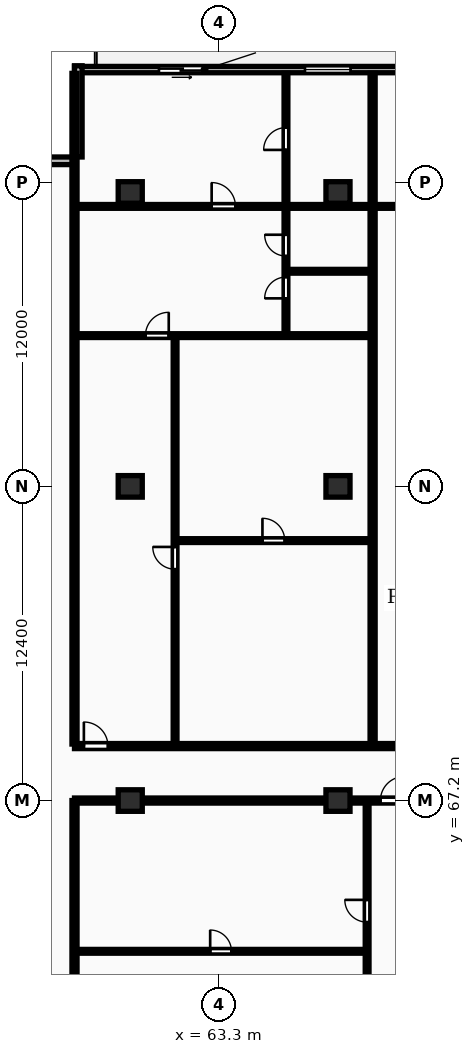
"""IFC4 building model, lengths in metres.
Left out: names, types, materials, properties, quantities, classifications, styles, units other than length and angle.
Written with IfcOpenShell. Run it as: python <this file> out.ifc"""

import sys

from ifc_helpers import new_model, si_unit, direction, frame, frame_2d, origin, origin_2d, place, context, subcontext, project, spatial, rectangle, extrude, element, fill, save


model = new_model("IFC4")
c1 = context("Model", 3, precision=1e-05, world=origin(), true_north=direction((0.0, 1.0)))
c2 = subcontext(c1, "Body", "Model", "MODEL_VIEW")
j1 = project(units=[si_unit("LENGTHUNIT", "METRE"), si_unit("PLANEANGLEUNIT", "RADIAN")], contexts=[c1])
p1 = place(None, origin())
s1 = spatial("IfcSite", under=j1, at=p1, CompositionType="ELEMENT")
p2 = place(p1, origin())
s2 = spatial("IfcBuilding", under=s1, at=p2, CompositionType="ELEMENT")
p3 = place(p2, frame((0.0, 0.0, 80.8)))
s3 = spatial("IfcBuildingStorey", under=s2, at=p3, CompositionType="ELEMENT", Elevation=80.8)
for number, where, z_axis, x_axis in (
    (1, (59.8, 67.2, 0.0), (0.0, 0.0, 1.0), (1.0, 0.0, 0.0)),
    (2, (59.8, 79.6, 0.0), (0.0, 0.0, 1.0), (1.0, 0.0, 0.0)),
    (3, (59.8, 91.2, 0.0), (0.0, 0.0, 1.0), (1.0, 0.0, 0.0)),
    (4, (68.0, 67.2, 0.0), (0.0, 0.0, 1.0), (1.0, 0.0, 0.0)),
    (5, (68.0, 79.6, 0.0), (0.0, 0.0, 1.0), (1.0, 0.0, 0.0)),
    (6, (68.0, 91.2, 0.0), (0.0, 0.0, 1.0), (1.0, 0.0, 0.0)),
):
    element("IfcColumn", number, at=place(p3, frame(where, z_axis=z_axis, x_axis=x_axis)), inside=s3, PredefinedType="COLUMN", context=c2, shape_type="SweptSolid", body=[
        extrude(rectangle(XDim=0.95, YDim=0.85, at=origin_2d()), origin(), (0.0, 0.0, 1.0), 3.25),
    ])
p4 = place(p3, frame((130.6, 96.05, 0.0), z_axis=(0.0, 0.0, 1.0), x_axis=(-1.0, 0.0, 0.0)))
e7 = element("IfcWall", 7, at=p4, inside=s3, PredefinedType="STANDARD", context=c2, shape_type="SweptSolid", body=[
    extrude(rectangle(XDim=73.0, YDim=0.25, at=frame_2d((36.5, 0.0))), origin(), (0.0, 0.0, 1.0), 2.97),
])
p5 = place(p4, frame((67.867, 0.0, 0.0)))
e8 = element("IfcOpeningElement", 8, at=p5, cuts=e7, PredefinedType="OPENING", context=c2, shape_type="SweptSolid", body=[
    extrude(rectangle(XDim=1.8, YDim=2.2, at=frame_2d((0.9, 1.1))), frame((0.0, 0.135, 0.0), z_axis=(0.0, -1.0, 0.0), x_axis=(1.0, 0.0, 0.0)), (0.0, 0.0, 1.0), 0.27),
])
p6 = place(p4, frame((62.103, 0.0, 0.85)))
e9 = element("IfcOpeningElement", 9, at=p6, cuts=e7, PredefinedType="OPENING", context=c2, shape_type="SweptSolid", body=[
    extrude(rectangle(XDim=1.8, YDim=1.8, at=frame_2d((0.9, 0.9))), frame((0.0, 0.135, 0.0), z_axis=(0.0, -1.0, 0.0), x_axis=(1.0, 0.0, 0.0)), (0.0, 0.0, 1.0), 0.27),
])
p7 = place(p4, frame((56.196, 0.0, 0.0)))
e10 = element("IfcOpeningElement", 10, at=p7, cuts=e7, PredefinedType="OPENING", context=c2, shape_type="SweptSolid", body=[
    extrude(rectangle(XDim=1.8, YDim=2.2, at=frame_2d((0.9, 1.1))), frame((0.0, 0.135, 0.0), z_axis=(0.0, -1.0, 0.0), x_axis=(1.0, 0.0, 0.0)), (0.0, 0.0, 1.0), 0.27),
])
p8 = place(p4, frame((46.557, 0.0, 0.85)))
e11 = element("IfcOpeningElement", 11, at=p8, cuts=e7, PredefinedType="OPENING", context=c2, shape_type="SweptSolid", body=[
    extrude(rectangle(XDim=2.4, YDim=1.9, at=frame_2d((1.2, 0.95))), frame((0.0, 0.135, 0.0), z_axis=(0.0, -1.0, 0.0), x_axis=(1.0, 0.0, 0.0)), (0.0, 0.0, 1.0), 0.27),
])
p9 = place(p4, frame((36.714, 0.0, 0.0)))
e12 = element("IfcOpeningElement", 12, at=p9, cuts=e7, PredefinedType="OPENING", context=c2, shape_type="SweptSolid", body=[
    extrude(rectangle(XDim=1.8, YDim=2.2, at=frame_2d((0.9, 1.1))), frame((0.0, 0.135, 0.0), z_axis=(0.0, -1.0, 0.0), x_axis=(1.0, 0.0, 0.0)), (0.0, 0.0, 1.0), 0.27),
])
p10 = place(p4, frame((30.483, 0.0, 0.85)))
e13 = element("IfcOpeningElement", 13, at=p10, cuts=e7, PredefinedType="OPENING", context=c2, shape_type="SweptSolid", body=[
    extrude(rectangle(XDim=1.8, YDim=1.8, at=frame_2d((0.9, 0.9))), frame((0.0, 0.135, 0.0), z_axis=(0.0, -1.0, 0.0), x_axis=(1.0, 0.0, 0.0)), (0.0, 0.0, 1.0), 0.27),
])
p11 = place(p4, frame((21.604, 0.0, 0.85)))
e14 = element("IfcOpeningElement", 14, at=p11, cuts=e7, PredefinedType="OPENING", context=c2, shape_type="SweptSolid", body=[
    extrude(rectangle(XDim=2.4, YDim=1.9, at=frame_2d((1.2, 0.95))), frame((0.0, 0.135, 0.0), z_axis=(0.0, -1.0, 0.0), x_axis=(1.0, 0.0, 0.0)), (0.0, 0.0, 1.0), 0.27),
])
p12 = place(p4, frame((17.698, 0.0, 0.85)))
e15 = element("IfcOpeningElement", 15, at=p12, cuts=e7, PredefinedType="OPENING", context=c2, shape_type="SweptSolid", body=[
    extrude(rectangle(XDim=1.8, YDim=1.8, at=frame_2d((0.9, 0.9))), frame((0.0, 0.135, 0.0), z_axis=(0.0, -1.0, 0.0), x_axis=(1.0, 0.0, 0.0)), (0.0, 0.0, 1.0), 0.27),
])
p13 = place(p4, frame((26.363, 0.0, 0.0)))
e16 = element("IfcOpeningElement", 16, at=p13, cuts=e7, PredefinedType="OPENING", context=c2, shape_type="SweptSolid", body=[
    extrude(rectangle(XDim=1.8, YDim=2.2, at=frame_2d((0.9, 1.1))), frame((0.0, 0.135, 0.0), z_axis=(0.0, -1.0, 0.0), x_axis=(1.0, 0.0, 0.0)), (0.0, 0.0, 1.0), 0.27),
])
p14 = place(p4, frame((13.753, 0.0, 0.85)))
e17 = element("IfcOpeningElement", 17, at=p14, cuts=e7, PredefinedType="OPENING", context=c2, shape_type="SweptSolid", body=[
    extrude(rectangle(XDim=1.8, YDim=1.8, at=frame_2d((0.9, 0.9))), frame((0.0, 0.135, 0.0), z_axis=(0.0, -1.0, 0.0), x_axis=(1.0, 0.0, 0.0)), (0.0, 0.0, 1.0), 0.27),
])
p15 = place(p4, frame((7.363, 0.0, 0.0)))
e18 = element("IfcOpeningElement", 18, at=p15, cuts=e7, PredefinedType="OPENING", context=c2, shape_type="SweptSolid", body=[
    extrude(rectangle(XDim=1.8, YDim=2.2, at=frame_2d((0.9, 1.1))), frame((0.0, 0.135, 0.0), z_axis=(0.0, -1.0, 0.0), x_axis=(1.0, 0.0, 0.0)), (0.0, 0.0, 1.0), 0.27),
])
p16 = place(p4, frame((0.9, 0.0, 0.85)))
e19 = element("IfcOpeningElement", 19, at=p16, cuts=e7, PredefinedType="OPENING", context=c2, shape_type="SweptSolid", body=[
    extrude(rectangle(XDim=2.4, YDim=1.9, at=frame_2d((1.2, 0.95))), frame((0.0, 0.135, 0.0), z_axis=(0.0, -1.0, 0.0), x_axis=(1.0, 0.0, 0.0)), (0.0, 0.0, 1.0), 0.27),
])
p17 = place(p3, frame((57.75, 96.2, 0.0), z_axis=(0.0, 0.0, 1.0), x_axis=(0.0, -1.0, 0.0)))
e20 = element("IfcWall", 20, at=p17, inside=s3, PredefinedType="STANDARD", context=c2, shape_type="SweptSolid", body=[
    extrude(rectangle(XDim=3.6, YDim=0.3, at=frame_2d((1.8, 0.0))), origin(), (0.0, 0.0, 1.0), 2.97),
])
p18 = place(p3, frame((57.6, 92.45, 0.0), z_axis=(0.0, 0.0, 1.0), x_axis=(-1.0, 0.0, 0.0)))
e21 = element("IfcWall", 21, at=p18, inside=s3, PredefinedType="STANDARD", context=c2, shape_type="SweptSolid", body=[
    extrude(rectangle(XDim=3.6, YDim=0.3, at=frame_2d((1.8, 0.0))), origin(), (0.0, 0.0, 1.0), 2.97),
])
p19 = place(p3, frame((57.6, 51.1, 0.0), z_axis=(0.0, 0.0, 1.0), x_axis=(0.0, 1.0, 0.0)))
e22 = element("IfcWall", 22, at=p19, inside=s3, PredefinedType="PARTITIONING", context=c2, shape_type="SweptSolid", body=[
    extrude(rectangle(XDim=16.1, YDim=0.2, at=frame_2d((8.05, 0.0))), origin(), (0.0, 0.0, 1.0), 2.97),
])
p20 = place(p3, frame((57.6, 61.25, 0.0), z_axis=(0.0, 0.0, 1.0), x_axis=(1.0, 0.0, 0.0)))
e23 = element("IfcWall", 23, at=p20, inside=s3, PredefinedType="PARTITIONING", context=c2, shape_type="SweptSolid", body=[
    extrude(rectangle(XDim=11.55, YDim=0.15, at=frame_2d((5.775, 0.0))), origin(), (0.0, 0.0, 1.0), 2.97),
])
p21 = place(p20, frame((5.355, 0.0, 0.0)))
e24 = element("IfcOpeningElement", 24, at=p21, cuts=e23, PredefinedType="OPENING", context=c2, shape_type="SweptSolid", body=[
    extrude(rectangle(XDim=0.84, YDim=2.04, at=frame_2d((0.42, 1.02))), frame((0.0, 0.085, 0.0), z_axis=(0.0, -1.0, 0.0), x_axis=(1.0, 0.0, 0.0)), (0.0, 0.0, 1.0), 0.17),
])
p22 = place(p3, frame((69.15, 51.1, 0.0), z_axis=(0.0, 0.0, 1.0), x_axis=(0.0, 1.0, 0.0)))
e25 = element("IfcWall", 25, at=p22, inside=s3, PredefinedType="PARTITIONING", context=c2, shape_type="SweptSolid", body=[
    extrude(rectangle(XDim=16.05, YDim=0.15, at=frame_2d((8.025, 0.0))), origin(), (0.0, 0.0, 1.0), 2.97),
])
p23 = place(p22, frame((11.3, 0.0, 0.0)))
e26 = element("IfcOpeningElement", 26, at=p23, cuts=e25, PredefinedType="OPENING", context=c2, shape_type="SweptSolid", body=[
    extrude(rectangle(XDim=0.88, YDim=2.06, at=frame_2d((0.44, 1.03))), frame((0.0, 0.085, 0.0), z_axis=(0.0, -1.0, 0.0), x_axis=(1.0, 0.0, 0.0)), (0.0, 0.0, 1.0), 0.17),
])
p24 = place(p3, frame((57.6, 67.2, 0.0), z_axis=(0.0, 0.0, 1.0), x_axis=(1.0, 0.0, 0.0)))
e27 = element("IfcWall", 27, at=p24, inside=s3, PredefinedType="PARTITIONING", context=c2, shape_type="SweptSolid", body=[
    extrude(rectangle(XDim=18.35, YDim=0.2, at=frame_2d((9.175, 0.0))), origin(), (0.0, 0.0, 1.0), 2.433),
])
p25 = place(p24, frame((12.075, 0.0, 0.0)))
e28 = element("IfcOpeningElement", 28, at=p25, cuts=e27, PredefinedType="OPENING", context=c2, shape_type="SweptSolid", body=[
    extrude(rectangle(XDim=0.95, YDim=2.15, at=frame_2d((0.475, 1.075))), frame((0.0, 0.11, 0.0), z_axis=(0.0, -1.0, 0.0), x_axis=(1.0, 0.0, 0.0)), (0.0, 0.0, 1.0), 0.22),
])
for number, where, z_axis, x_axis in (
    (29, (57.6, 69.43, 0.0), (0.0, 0.0, 1.0), (0.0, 1.0, 0.0)),
    (30, (69.367, 69.43, 0.0), (0.0, 0.0, 1.0), (0.0, 1.0, 0.0)),
):
    element("IfcWall", number, at=place(p3, frame(where, z_axis=z_axis, x_axis=x_axis)), inside=s3, PredefinedType="PARTITIONING", context=c2, shape_type="SweptSolid", body=[
        extrude(rectangle(XDim=26.47, YDim=0.2, at=frame_2d((13.235, 0.0))), origin(), (0.0, 0.0, 1.0), 2.97),
    ])
p26 = place(p3, frame((61.63, 77.46, 0.0), z_axis=(0.0, 0.0, 1.0), x_axis=(1.0, 0.0, 0.0)))
e31 = element("IfcWall", 31, at=p26, inside=s3, PredefinedType="PARTITIONING", context=c2, shape_type="SweptSolid", body=[
    extrude(rectangle(XDim=7.657, YDim=0.15, at=frame_2d((3.828, 0.0))), origin(), (0.0, 0.0, 1.0), 2.97),
])
p27 = place(p26, frame((3.388, 0.0, 0.0)))
e32 = element("IfcOpeningElement", 32, at=p27, cuts=e31, PredefinedType="OPENING", context=c2, shape_type="SweptSolid", body=[
    extrude(rectangle(XDim=0.88, YDim=2.06, at=frame_2d((0.44, 1.03))), frame((0.0, 0.085, 0.0), z_axis=(0.0, -1.0, 0.0), x_axis=(1.0, 0.0, 0.0)), (0.0, 0.0, 1.0), 0.17),
])
p28 = place(p3, frame((61.57, 69.41, 0.0), z_axis=(0.0, 0.0, 1.0), x_axis=(0.0, 1.0, 0.0)))
e33 = element("IfcWall", 33, at=p28, inside=s3, PredefinedType="PARTITIONING", context=c2, shape_type="SweptSolid", body=[
    extrude(rectangle(XDim=16.1, YDim=0.15, at=frame_2d((8.05, 0.0))), origin(), (0.0, 0.0, 1.0), 2.97),
])
p29 = place(p28, frame((6.92, 0.0, 0.0)))
e34 = element("IfcOpeningElement", 34, at=p29, cuts=e33, PredefinedType="OPENING", context=c2, shape_type="SweptSolid", body=[
    extrude(rectangle(XDim=0.88, YDim=2.06, at=frame_2d((0.44, 1.03))), frame((0.0, 0.085, 0.0), z_axis=(0.0, -1.0, 0.0), x_axis=(1.0, 0.0, 0.0)), (0.0, 0.0, 1.0), 0.17),
])
p30 = place(p3, frame((66.007, 88.09, 0.0), z_axis=(0.0, 0.0, 1.0), x_axis=(1.0, 0.0, 0.0)))
e35 = element("IfcWall", 35, at=p30, inside=s3, PredefinedType="PARTITIONING", context=c2, shape_type="SweptSolid", body=[
    extrude(rectangle(XDim=3.28, YDim=0.15, at=frame_2d((1.64, 0.0))), origin(), (0.0, 0.0, 1.0), 2.97),
])
p31 = place(p3, frame((65.947, 85.59, 0.0), z_axis=(0.0, 0.0, 1.0), x_axis=(0.0, 1.0, 0.0)))
e36 = element("IfcWall", 36, at=p31, inside=s3, PredefinedType="PARTITIONING", context=c2, shape_type="SweptSolid", body=[
    extrude(rectangle(XDim=10.31, YDim=0.15, at=frame_2d((5.155, 0.0))), origin(), (0.0, 0.0, 1.0), 2.97),
])
p32 = place(p31, frame((1.43, 0.0, 0.0)))
e37 = element("IfcOpeningElement", 37, at=p32, cuts=e36, PredefinedType="OPENING", context=c2, shape_type="SweptSolid", body=[
    extrude(rectangle(XDim=0.84, YDim=2.04, at=frame_2d((0.42, 1.02))), frame((0.0, 0.085, 0.0), z_axis=(0.0, -1.0, 0.0), x_axis=(1.0, 0.0, 0.0)), (0.0, 0.0, 1.0), 0.17),
])
p33 = place(p31, frame((3.102, 0.0, 0.0)))
e38 = element("IfcOpeningElement", 38, at=p33, cuts=e36, PredefinedType="OPENING", context=c2, shape_type="SweptSolid", body=[
    extrude(rectangle(XDim=0.84, YDim=2.04, at=frame_2d((0.42, 1.02))), frame((0.0, 0.085, 0.0), z_axis=(0.0, -1.0, 0.0), x_axis=(1.0, 0.0, 0.0)), (0.0, 0.0, 1.0), 0.17),
])
p34 = place(p31, frame((7.29, 0.0, 0.0)))
e39 = element("IfcOpeningElement", 39, at=p34, cuts=e36, PredefinedType="OPENING", context=c2, shape_type="SweptSolid", body=[
    extrude(rectangle(XDim=0.88, YDim=2.06, at=frame_2d((0.44, 1.03))), frame((0.0, 0.085, 0.0), z_axis=(0.0, -1.0, 0.0), x_axis=(1.0, 0.0, 0.0)), (0.0, 0.0, 1.0), 0.17),
])
p35 = place(p3, frame((57.68, 85.55, 0.0), z_axis=(0.0, 0.0, 1.0), x_axis=(1.0, 0.0, 0.0)))
e40 = element("IfcWall", 40, at=p35, inside=s3, PredefinedType="PARTITIONING", context=c2, shape_type="SweptSolid", body=[
    extrude(rectangle(XDim=11.607, YDim=0.15, at=frame_2d((5.803, 0.0))), origin(), (0.0, 0.0, 1.0), 2.97),
])
p36 = place(p35, frame((2.72, 0.0, 0.0)))
e41 = element("IfcOpeningElement", 41, at=p36, cuts=e40, PredefinedType="OPENING", context=c2, shape_type="SweptSolid", body=[
    extrude(rectangle(XDim=0.92, YDim=2.08, at=frame_2d((0.46, 1.04))), frame((0.0, 0.085, 0.0), z_axis=(0.0, -1.0, 0.0), x_axis=(1.0, 0.0, 0.0)), (0.0, 0.0, 1.0), 0.17),
])
p37 = place(p3, frame((57.68, 90.65, 0.0), z_axis=(0.0, 0.0, 1.0), x_axis=(1.0, 0.0, 0.0)))
e42 = element("IfcWall", 42, at=p37, inside=s3, PredefinedType="PARTITIONING", context=c2, shape_type="SweptSolid", body=[
    extrude(rectangle(XDim=11.607, YDim=0.15, at=frame_2d((5.803, 0.0))), origin(), (0.0, 0.0, 1.0), 2.97),
])
p38 = place(p37, frame((5.333, 0.0, 0.0)))
e43 = element("IfcOpeningElement", 43, at=p38, cuts=e42, PredefinedType="OPENING", context=c2, shape_type="SweptSolid", body=[
    extrude(rectangle(XDim=0.94, YDim=2.1, at=frame_2d((0.47, 1.05))), frame((0.0, 0.085, 0.0), z_axis=(0.0, -1.0, 0.0), x_axis=(1.0, 0.0, 0.0)), (0.0, 0.0, 1.0), 0.17),
])
p39 = place(p3, frame((69.447, 90.65, 0.0), z_axis=(0.0, 0.0, 1.0), x_axis=(1.0, 0.0, 0.0)))
e44 = element("IfcWall", 44, at=p39, inside=s3, PredefinedType="PARTITIONING", context=c2, shape_type="SweptSolid", body=[
    extrude(rectangle(XDim=18.758, YDim=0.15, at=frame_2d((9.379, 0.0))), origin(), (0.0, 0.0, 1.0), 2.97),
])
p40 = place(p39, frame((3.965, 0.0, 0.0)))
e45 = element("IfcOpeningElement", 45, at=p40, cuts=e44, PredefinedType="OPENING", context=c2, shape_type="SweptSolid", body=[
    extrude(rectangle(XDim=0.94, YDim=2.1, at=frame_2d((0.47, 1.05))), frame((0.0, 0.085, 0.0), z_axis=(0.0, -1.0, 0.0), x_axis=(1.0, 0.0, 0.0)), (0.0, 0.0, 1.0), 0.17),
])
p41 = place(p39, frame((8.909, 0.0, 0.0)))
e46 = element("IfcOpeningElement", 46, at=p41, cuts=e44, PredefinedType="OPENING", context=c2, shape_type="SweptSolid", body=[
    extrude(rectangle(XDim=0.94, YDim=2.1, at=frame_2d((0.47, 1.05))), frame((0.0, 0.085, 0.0), z_axis=(0.0, -1.0, 0.0), x_axis=(1.0, 0.0, 0.0)), (0.0, 0.0, 1.0), 0.17),
])
p42 = place(p3, frame((57.6, 69.35, 0.0), z_axis=(0.0, 0.0, 1.0), x_axis=(1.0, 0.0, 0.0)))
e47 = element("IfcWall", 47, at=p42, inside=s3, PredefinedType="PARTITIONING", context=c2, shape_type="SweptSolid", body=[
    extrude(rectangle(XDim=73.0, YDim=0.2, at=frame_2d((36.5, 0.0))), origin(), (0.0, 0.0, 1.0), 2.97),
])
p43 = place(p42, frame((0.37, 0.0, 0.0)))
e48 = element("IfcOpeningElement", 48, at=p43, cuts=e47, PredefinedType="OPENING", context=c2, shape_type="SweptSolid", body=[
    extrude(rectangle(XDim=0.95, YDim=2.15, at=frame_2d((0.475, 1.075))), frame((0.0, 0.11, 0.0), z_axis=(0.0, -1.0, 0.0), x_axis=(1.0, 0.0, 0.0)), (0.0, 0.0, 1.0), 0.22),
])
p44 = place(p42, frame((20.421, 0.0, 0.0)))
e49 = element("IfcOpeningElement", 49, at=p44, cuts=e47, PredefinedType="OPENING", context=c2, shape_type="SweptSolid", body=[
    extrude(rectangle(XDim=1.22, YDim=2.18, at=frame_2d((0.61, 1.09))), frame((0.0, 0.11, 0.0), z_axis=(0.0, -1.0, 0.0), x_axis=(1.0, 0.0, 0.0)), (0.0, 0.0, 1.0), 0.22),
])
p45 = place(p42, frame((32.729, 0.0, 0.0)))
e50 = element("IfcOpeningElement", 50, at=p45, cuts=e47, PredefinedType="OPENING", context=c2, shape_type="SweptSolid", body=[
    extrude(rectangle(XDim=0.95, YDim=2.15, at=frame_2d((0.475, 1.075))), frame((0.0, 0.11, 0.0), z_axis=(0.0, -1.0, 0.0), x_axis=(1.0, 0.0, 0.0)), (0.0, 0.0, 1.0), 0.22),
])
p46 = place(p42, frame((46.157, 0.0, 0.0)))
e51 = element("IfcOpeningElement", 51, at=p46, cuts=e47, PredefinedType="OPENING", context=c2, shape_type="SweptSolid", body=[
    extrude(rectangle(XDim=0.95, YDim=2.15, at=frame_2d((0.475, 1.075))), frame((0.0, 0.11, 0.0), z_axis=(0.0, -1.0, 0.0), x_axis=(1.0, 0.0, 0.0)), (0.0, 0.0, 1.0), 0.22),
])
p47 = place(p42, frame((60.803, 0.0, 0.0)))
e52 = element("IfcOpeningElement", 52, at=p47, cuts=e47, PredefinedType="OPENING", context=c2, shape_type="SweptSolid", body=[
    extrude(rectangle(XDim=0.95, YDim=2.15, at=frame_2d((0.475, 1.075))), frame((0.0, 0.11, 0.0), z_axis=(0.0, -1.0, 0.0), x_axis=(1.0, 0.0, 0.0)), (0.0, 0.0, 1.0), 0.22),
])
p48 = place(p5, origin())
e53 = element("IfcDoor", 53, at=p48, inside=s3, OperationType="SLIDING_TO_LEFT", PredefinedType="DOOR", context=c2, shape_type="SweptSolid", body=[
    extrude(rectangle(XDim=1.8, YDim=2.2, at=frame_2d((0.9, 1.1))), frame((0.0, 0.025, 0.0), z_axis=(0.0, -1.0, 0.0), x_axis=(1.0, 0.0, 0.0)), (0.0, 0.0, 1.0), 0.05),
])
fill(e8, e53)
p49 = place(p6, origin())
e54 = element("IfcWindow", 54, at=p49, inside=s3, PartitioningType="SINGLE_PANEL", PredefinedType="WINDOW", context=c2, shape_type="SweptSolid", body=[
    extrude(rectangle(XDim=1.8, YDim=1.8, at=frame_2d((0.9, 0.9))), frame((0.0, 0.03, 0.0), z_axis=(0.0, -1.0, 0.0), x_axis=(1.0, 0.0, 0.0)), (0.0, 0.0, 1.0), 0.06),
])
fill(e9, e54)
p50 = place(p21, origin())
e55 = element("IfcDoor", 55, at=p50, inside=s3, OperationType="SINGLE_SWING_LEFT", PredefinedType="DOOR", context=c2, shape_type="SweptSolid", body=[
    extrude(rectangle(XDim=0.84, YDim=2.04, at=frame_2d((0.42, 1.02))), frame((0.0, 0.025, 0.0), z_axis=(0.0, -1.0, 0.0), x_axis=(1.0, 0.0, 0.0)), (0.0, 0.0, 1.0), 0.05),
])
fill(e24, e55)
p51 = place(p23, origin())
e56 = element("IfcDoor", 56, at=p51, inside=s3, OperationType="SINGLE_SWING_RIGHT", PredefinedType="DOOR", context=c2, shape_type="SweptSolid", body=[
    extrude(rectangle(XDim=0.88, YDim=2.06, at=frame_2d((0.44, 1.03))), frame((0.0, 0.025, 0.0), z_axis=(0.0, -1.0, 0.0), x_axis=(1.0, 0.0, 0.0)), (0.0, 0.0, 1.0), 0.05),
])
fill(e26, e56)
p52 = place(p25, origin())
e57 = element("IfcDoor", 57, at=p52, inside=s3, OperationType="SINGLE_SWING_RIGHT", PredefinedType="DOOR", context=c2, shape_type="SweptSolid", body=[
    extrude(rectangle(XDim=0.95, YDim=2.15, at=frame_2d((0.475, 1.075))), frame((0.0, 0.025, 0.0), z_axis=(0.0, -1.0, 0.0), x_axis=(1.0, 0.0, 0.0)), (0.0, 0.0, 1.0), 0.05),
])
fill(e28, e57)
p53 = place(p27, origin())
e58 = element("IfcDoor", 58, at=p53, inside=s3, OperationType="SINGLE_SWING_LEFT", PredefinedType="DOOR", context=c2, shape_type="SweptSolid", body=[
    extrude(rectangle(XDim=0.88, YDim=2.06, at=frame_2d((0.44, 1.03))), frame((0.0, 0.025, 0.0), z_axis=(0.0, -1.0, 0.0), x_axis=(1.0, 0.0, 0.0)), (0.0, 0.0, 1.0), 0.05),
])
fill(e32, e58)
p54 = place(p29, origin())
e59 = element("IfcDoor", 59, at=p54, inside=s3, OperationType="SINGLE_SWING_RIGHT", PredefinedType="DOOR", context=c2, shape_type="SweptSolid", body=[
    extrude(rectangle(XDim=0.88, YDim=2.06, at=frame_2d((0.44, 1.03))), frame((0.0, 0.025, 0.0), z_axis=(0.0, -1.0, 0.0), x_axis=(1.0, 0.0, 0.0)), (0.0, 0.0, 1.0), 0.05),
])
fill(e34, e59)
p55 = place(p32, origin())
e60 = element("IfcDoor", 60, at=p55, inside=s3, OperationType="SINGLE_SWING_LEFT", PredefinedType="DOOR", context=c2, shape_type="SweptSolid", body=[
    extrude(rectangle(XDim=0.84, YDim=2.04, at=frame_2d((0.42, 1.02))), frame((0.0, 0.025, 0.0), z_axis=(0.0, -1.0, 0.0), x_axis=(1.0, 0.0, 0.0)), (0.0, 0.0, 1.0), 0.05),
])
fill(e37, e60)
p56 = place(p33, origin())
e61 = element("IfcDoor", 61, at=p56, inside=s3, OperationType="SINGLE_SWING_RIGHT", PredefinedType="DOOR", context=c2, shape_type="SweptSolid", body=[
    extrude(rectangle(XDim=0.84, YDim=2.04, at=frame_2d((0.42, 1.02))), frame((0.0, 0.025, 0.0), z_axis=(0.0, -1.0, 0.0), x_axis=(1.0, 0.0, 0.0)), (0.0, 0.0, 1.0), 0.05),
])
fill(e38, e61)
p57 = place(p34, origin())
e62 = element("IfcDoor", 62, at=p57, inside=s3, OperationType="SINGLE_SWING_LEFT", PredefinedType="DOOR", context=c2, shape_type="SweptSolid", body=[
    extrude(rectangle(XDim=0.88, YDim=2.06, at=frame_2d((0.44, 1.03))), frame((0.0, 0.025, 0.0), z_axis=(0.0, -1.0, 0.0), x_axis=(1.0, 0.0, 0.0)), (0.0, 0.0, 1.0), 0.05),
])
fill(e39, e62)
p58 = place(p36, origin())
e63 = element("IfcDoor", 63, at=p58, inside=s3, OperationType="SINGLE_SWING_RIGHT", PredefinedType="DOOR", context=c2, shape_type="SweptSolid", body=[
    extrude(rectangle(XDim=0.92, YDim=2.08, at=frame_2d((0.46, 1.04))), frame((0.0, 0.025, 0.0), z_axis=(0.0, -1.0, 0.0), x_axis=(1.0, 0.0, 0.0)), (0.0, 0.0, 1.0), 0.05),
])
fill(e41, e63)
p59 = place(p38, origin())
e64 = element("IfcDoor", 64, at=p59, inside=s3, OperationType="SINGLE_SWING_LEFT", PredefinedType="DOOR", context=c2, shape_type="SweptSolid", body=[
    extrude(rectangle(XDim=0.94, YDim=2.1, at=frame_2d((0.47, 1.05))), frame((0.0, 0.025, 0.0), z_axis=(0.0, -1.0, 0.0), x_axis=(1.0, 0.0, 0.0)), (0.0, 0.0, 1.0), 0.05),
])
fill(e43, e64)
p60 = place(p43, origin())
e65 = element("IfcDoor", 65, at=p60, inside=s3, OperationType="SINGLE_SWING_LEFT", PredefinedType="DOOR", context=c2, shape_type="SweptSolid", body=[
    extrude(rectangle(XDim=0.95, YDim=2.15, at=frame_2d((0.475, 1.075))), frame((0.0, 0.025, 0.0), z_axis=(0.0, -1.0, 0.0), x_axis=(1.0, 0.0, 0.0)), (0.0, 0.0, 1.0), 0.05),
])
fill(e48, e65)
save(model, sys.argv[1])
